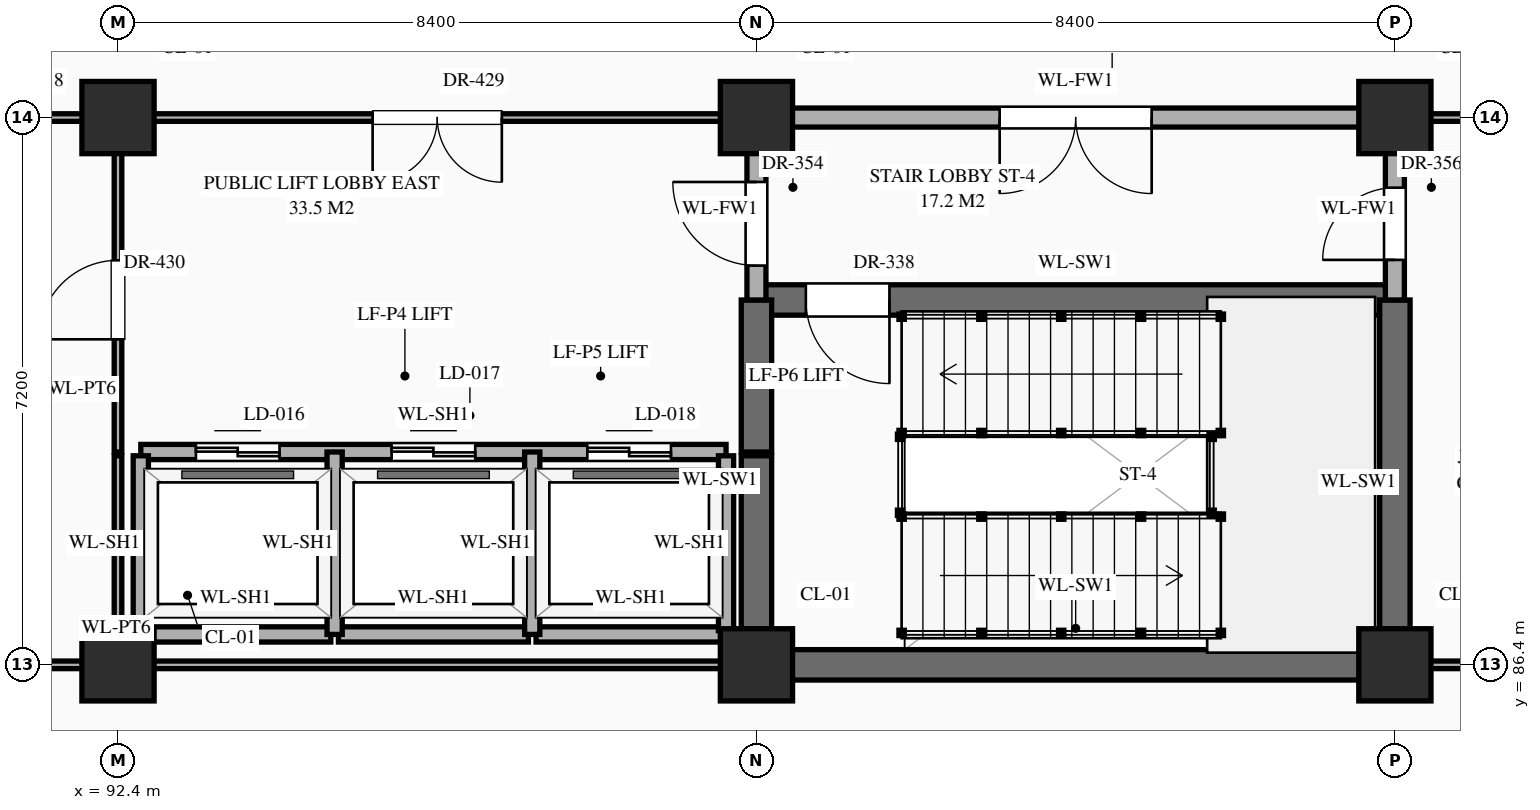
"""IFC4 building model, lengths in metres.
Left out: names, types, materials, properties, quantities, classifications, styles, units other than length and angle.
Written with IfcOpenShell. Run it as: python <this file> out.ifc"""

import sys

from ifc_helpers import new_model, si_unit, direction, frame, frame_2d, origin, origin_2d, place, context, subcontext, project, spatial, rectangle, extrude, element, fill, save


model = new_model("IFC4")
c1 = context("Model", 3, precision=1e-05, world=origin(), true_north=direction((0.0, 1.0)))
c2 = subcontext(c1, "Body", "Model", "MODEL_VIEW")
j1 = project(units=[si_unit("LENGTHUNIT", "METRE"), si_unit("PLANEANGLEUNIT", "RADIAN")], contexts=[c1])
p1 = place(None, origin())
s1 = spatial("IfcSite", under=j1, at=p1, CompositionType="ELEMENT")
p2 = place(p1, origin())
s2 = spatial("IfcBuilding", under=s1, at=p2, CompositionType="ELEMENT")
p3 = place(p2, frame((0.0, 0.0, -5.4)))
s3 = spatial("IfcBuildingStorey", under=s2, at=p3, CompositionType="ELEMENT", Elevation=-5.4)
for number, where, z_axis, x_axis in (
    (1, (92.4, 86.4, 0.0), (0.0, 0.0, 1.0), (1.0, 0.0, 0.0)),
    (2, (92.4, 93.6, 0.0), (0.0, 0.0, 1.0), (1.0, 0.0, 0.0)),
    (3, (100.8, 86.4, 0.0), (0.0, 0.0, 1.0), (1.0, 0.0, 0.0)),
    (4, (100.8, 93.6, 0.0), (0.0, 0.0, 1.0), (1.0, 0.0, 0.0)),
    (5, (109.2, 86.4, 0.0), (0.0, 0.0, 1.0), (1.0, 0.0, 0.0)),
    (6, (109.2, 93.6, 0.0), (0.0, 0.0, 1.0), (1.0, 0.0, 0.0)),
):
    element("IfcColumn", number, at=place(p3, frame(where, z_axis=z_axis, x_axis=x_axis)), inside=s3, PredefinedType="COLUMN", context=c2, shape_type="SweptSolid", body=[
        extrude(rectangle(XDim=0.95, YDim=0.95, at=origin_2d()), origin(), (0.0, 0.0, 1.0), 5.4),
    ])
p4 = place(p3, frame((84.0, 86.4, 0.0), z_axis=(0.0, 0.0, 1.0), x_axis=(1.0, 0.0, 0.0)))
e7 = element("IfcWall", 7, at=p4, inside=s3, PredefinedType="STANDARD", context=c2, shape_type="SweptSolid", body=[
    extrude(rectangle(XDim=8.4, YDim=0.1, at=frame_2d((4.2, 0.0))), origin(), (0.0, 0.0, 1.0), 4.25),
])
p5 = place(p4, frame((1.018, 0.0, 0.0)))
e8 = element("IfcOpeningElement", 8, at=p5, cuts=e7, PredefinedType="OPENING", context=c2, shape_type="SweptSolid", body=[
    extrude(rectangle(XDim=1.16, YDim=2.3, at=frame_2d((0.58, 1.15))), frame((0.0, 0.062, 0.0), z_axis=(0.0, -1.0, 0.0), x_axis=(1.0, 0.0, 0.0)), (0.0, 0.0, 1.0), 0.124),
])
p6 = place(p4, frame((3.58, 0.0, 0.0)))
e9 = element("IfcOpeningElement", 9, at=p6, cuts=e7, PredefinedType="OPENING", context=c2, shape_type="SweptSolid", body=[
    extrude(rectangle(XDim=1.24, YDim=2.3, at=frame_2d((0.62, 1.15))), frame((0.0, 0.062, 0.0), z_axis=(0.0, -1.0, 0.0), x_axis=(1.0, 0.0, 0.0)), (0.0, 0.0, 1.0), 0.124),
])
p7 = place(p4, frame((6.163, 0.0, 0.0)))
e10 = element("IfcOpeningElement", 10, at=p7, cuts=e7, PredefinedType="OPENING", context=c2, shape_type="SweptSolid", body=[
    extrude(rectangle(XDim=1.28, YDim=2.35, at=frame_2d((0.64, 1.175))), frame((0.0, 0.062, 0.0), z_axis=(0.0, -1.0, 0.0), x_axis=(1.0, 0.0, 0.0)), (0.0, 0.0, 1.0), 0.124),
])
p8 = place(p3, frame((92.45, 86.4, 0.0), z_axis=(0.0, 0.0, 1.0), x_axis=(1.0, 0.0, 0.0)))
e11 = element("IfcWall", 11, at=p8, inside=s3, PredefinedType="STANDARD", context=c2, shape_type="SweptSolid", body=[
    extrude(rectangle(XDim=8.3, YDim=0.1, at=frame_2d((4.15, 0.0))), origin(), (0.0, 0.0, 1.0), 4.25),
])
p9 = place(p3, frame((100.8, 86.4, 0.0), z_axis=(0.0, 0.0, 1.0), x_axis=(1.0, 0.0, 0.0)))
e12 = element("IfcWall", 12, at=p9, inside=s3, PredefinedType="SHEAR", context=c2, shape_type="SweptSolid", body=[
    extrude(rectangle(XDim=8.4, YDim=0.4, at=frame_2d((4.2, 0.0))), origin(), (0.0, 0.0, 1.0), 5.1),
])
p10 = place(p3, frame((109.2, 86.4, 0.0), z_axis=(0.0, 0.0, 1.0), x_axis=(1.0, 0.0, 0.0)))
e13 = element("IfcWall", 13, at=p10, inside=s3, PredefinedType="STANDARD", context=c2, shape_type="SweptSolid", body=[
    extrude(rectangle(XDim=8.4, YDim=0.1, at=frame_2d((4.2, 0.0))), origin(), (0.0, 0.0, 1.0), 4.25),
])
p11 = place(p10, frame((1.107, 0.0, 0.0)))
e14 = element("IfcOpeningElement", 14, at=p11, cuts=e13, PredefinedType="OPENING", context=c2, shape_type="SweptSolid", body=[
    extrude(rectangle(XDim=0.98, YDim=2.35, at=frame_2d((0.49, 1.175))), frame((0.0, 0.062, 0.0), z_axis=(0.0, -1.0, 0.0), x_axis=(1.0, 0.0, 0.0)), (0.0, 0.0, 1.0), 0.124),
])
p12 = place(p10, frame((3.67, 0.0, 0.0)))
e15 = element("IfcOpeningElement", 15, at=p12, cuts=e13, PredefinedType="OPENING", context=c2, shape_type="SweptSolid", body=[
    extrude(rectangle(XDim=1.06, YDim=2.4, at=frame_2d((0.53, 1.2))), frame((0.0, 0.062, 0.0), z_axis=(0.0, -1.0, 0.0), x_axis=(1.0, 0.0, 0.0)), (0.0, 0.0, 1.0), 0.124),
])
p13 = place(p10, frame((6.232, 0.0, 0.0)))
e16 = element("IfcOpeningElement", 16, at=p13, cuts=e13, PredefinedType="OPENING", context=c2, shape_type="SweptSolid", body=[
    extrude(rectangle(XDim=1.14, YDim=2.4, at=frame_2d((0.57, 1.2))), frame((0.0, 0.062, 0.0), z_axis=(0.0, -1.0, 0.0), x_axis=(1.0, 0.0, 0.0)), (0.0, 0.0, 1.0), 0.124),
])
for number, where, z_axis, x_axis in (
    (17, (92.7, 86.8, 0.0), (0.0, 0.0, 1.0), (1.0, 0.0, 0.0)),
    (18, (95.3, 86.8, 0.0), (0.0, 0.0, 1.0), (1.0, 0.0, 0.0)),
    (19, (97.9, 86.8, 0.0), (0.0, 0.0, 1.0), (1.0, 0.0, 0.0)),
):
    element("IfcWall", number, at=place(p3, frame(where, z_axis=z_axis, x_axis=x_axis)), inside=s3, PredefinedType="STANDARD", context=c2, shape_type="SweptSolid", body=[
        extrude(rectangle(XDim=2.5, YDim=0.2, at=frame_2d((1.25, 0.0))), origin(), (0.0, 0.0, 1.0), 5.1),
    ])
p14 = place(p3, frame((92.7, 89.2, 0.0), z_axis=(0.0, 0.0, 1.0), x_axis=(1.0, 0.0, 0.0)))
e20 = element("IfcWall", 20, at=p14, inside=s3, PredefinedType="STANDARD", context=c2, shape_type="SweptSolid", body=[
    extrude(rectangle(XDim=7.7, YDim=0.2, at=frame_2d((3.85, 0.0))), origin(), (0.0, 0.0, 1.0), 5.1),
])
p15 = place(p14, frame((0.725, 0.0, 0.0)))
e21 = element("IfcOpeningElement", 21, at=p15, cuts=e20, PredefinedType="OPENING", context=c2, shape_type="SweptSolid", body=[
    extrude(rectangle(XDim=1.1, YDim=2.15, at=frame_2d((0.55, 1.075))), frame((0.0, 0.112, 0.0), z_axis=(0.0, -1.0, 0.0), x_axis=(1.0, 0.0, 0.0)), (0.0, 0.0, 1.0), 0.224),
])
p16 = place(p14, frame((3.3, 0.0, 0.0)))
e22 = element("IfcOpeningElement", 22, at=p16, cuts=e20, PredefinedType="OPENING", context=c2, shape_type="SweptSolid", body=[
    extrude(rectangle(XDim=1.1, YDim=2.15, at=frame_2d((0.55, 1.075))), frame((0.0, 0.112, 0.0), z_axis=(0.0, -1.0, 0.0), x_axis=(1.0, 0.0, 0.0)), (0.0, 0.0, 1.0), 0.224),
])
p17 = place(p14, frame((5.875, 0.0, 0.0)))
e23 = element("IfcOpeningElement", 23, at=p17, cuts=e20, PredefinedType="OPENING", context=c2, shape_type="SweptSolid", body=[
    extrude(rectangle(XDim=1.1, YDim=2.15, at=frame_2d((0.55, 1.075))), frame((0.0, 0.112, 0.0), z_axis=(0.0, -1.0, 0.0), x_axis=(1.0, 0.0, 0.0)), (0.0, 0.0, 1.0), 0.224),
])
p18 = place(p3, frame((100.8, 91.2, 0.0), z_axis=(0.0, 0.0, 1.0), x_axis=(1.0, 0.0, 0.0)))
e24 = element("IfcWall", 24, at=p18, inside=s3, PredefinedType="SHEAR", context=c2, shape_type="SweptSolid", body=[
    extrude(rectangle(XDim=8.4, YDim=0.4, at=frame_2d((4.2, 0.0))), origin(), (0.0, 0.0, 1.0), 5.1),
])
p19 = place(p18, frame((0.65, 0.0, 0.0)))
e25 = element("IfcOpeningElement", 25, at=p19, cuts=e24, PredefinedType="OPENING", context=c2, shape_type="SweptSolid", body=[
    extrude(rectangle(XDim=1.1, YDim=2.2, at=frame_2d((0.55, 1.1))), frame((0.0, 0.212, 0.0), z_axis=(0.0, -1.0, 0.0), x_axis=(1.0, 0.0, 0.0)), (0.0, 0.0, 1.0), 0.424),
])
p20 = place(p3, frame((67.2, 93.6, 0.0), z_axis=(0.0, 0.0, 1.0), x_axis=(1.0, 0.0, 0.0)))
e26 = element("IfcWall", 26, at=p20, inside=s3, PredefinedType="STANDARD", context=c2, shape_type="SweptSolid", body=[
    extrude(rectangle(XDim=33.6, YDim=0.1, at=frame_2d((16.8, 0.0))), origin(), (0.0, 0.0, 1.0), 4.25),
])
p21 = place(p20, frame((3.425, 0.0, 0.0)))
e27 = element("IfcOpeningElement", 27, at=p21, cuts=e26, PredefinedType="OPENING", context=c2, shape_type="SweptSolid", body=[
    extrude(rectangle(XDim=1.55, YDim=2.35, at=frame_2d((0.775, 1.175))), frame((0.0, 0.062, 0.0), z_axis=(0.0, -1.0, 0.0), x_axis=(1.0, 0.0, 0.0)), (0.0, 0.0, 1.0), 0.124),
])
p22 = place(p20, frame((28.55, 0.0, 0.0)))
e28 = element("IfcOpeningElement", 28, at=p22, cuts=e26, PredefinedType="OPENING", context=c2, shape_type="SweptSolid", body=[
    extrude(rectangle(XDim=1.7, YDim=2.45, at=frame_2d((0.85, 1.225))), frame((0.0, 0.062, 0.0), z_axis=(0.0, -1.0, 0.0), x_axis=(1.0, 0.0, 0.0)), (0.0, 0.0, 1.0), 0.124),
])
p23 = place(p20, frame((11.875, 0.0, 0.0)))
e29 = element("IfcOpeningElement", 29, at=p23, cuts=e26, PredefinedType="OPENING", context=c2, shape_type="SweptSolid", body=[
    extrude(rectangle(XDim=1.45, YDim=2.3, at=frame_2d((0.725, 1.15))), frame((0.0, 0.062, 0.0), z_axis=(0.0, -1.0, 0.0), x_axis=(1.0, 0.0, 0.0)), (0.0, 0.0, 1.0), 0.124),
])
p24 = place(p20, frame((17.857, 0.0, 0.0)))
e30 = element("IfcOpeningElement", 30, at=p24, cuts=e26, PredefinedType="OPENING", context=c2, shape_type="SweptSolid", body=[
    extrude(rectangle(XDim=1.08, YDim=2.25, at=frame_2d((0.54, 1.125))), frame((0.0, 0.062, 0.0), z_axis=(0.0, -1.0, 0.0), x_axis=(1.0, 0.0, 0.0)), (0.0, 0.0, 1.0), 0.124),
])
p25 = place(p20, frame((20.44, 0.0, 0.0)))
e31 = element("IfcOpeningElement", 31, at=p25, cuts=e26, PredefinedType="OPENING", context=c2, shape_type="SweptSolid", body=[
    extrude(rectangle(XDim=1.12, YDim=2.25, at=frame_2d((0.56, 1.125))), frame((0.0, 0.062, 0.0), z_axis=(0.0, -1.0, 0.0), x_axis=(1.0, 0.0, 0.0)), (0.0, 0.0, 1.0), 0.124),
])
p26 = place(p20, frame((23.022, 0.0, 0.0)))
e32 = element("IfcOpeningElement", 32, at=p26, cuts=e26, PredefinedType="OPENING", context=c2, shape_type="SweptSolid", body=[
    extrude(rectangle(XDim=1.16, YDim=2.3, at=frame_2d((0.58, 1.15))), frame((0.0, 0.062, 0.0), z_axis=(0.0, -1.0, 0.0), x_axis=(1.0, 0.0, 0.0)), (0.0, 0.0, 1.0), 0.124),
])
p27 = place(p3, frame((100.8, 93.6, 0.0), z_axis=(0.0, 0.0, 1.0), x_axis=(1.0, 0.0, 0.0)))
e33 = element("IfcWall", 33, at=p27, inside=s3, PredefinedType="STANDARD", context=c2, shape_type="SweptSolid", body=[
    extrude(rectangle(XDim=8.4, YDim=0.25, at=frame_2d((4.2, 0.0))), origin(), (0.0, 0.0, 1.0), 4.25),
])
p28 = place(p27, frame((3.2, 0.0, 0.0)))
e34 = element("IfcOpeningElement", 34, at=p28, cuts=e33, PredefinedType="OPENING", context=c2, shape_type="SweptSolid", body=[
    extrude(rectangle(XDim=2.0, YDim=2.4, at=frame_2d((1.0, 1.2))), frame((0.0, 0.137, 0.0), z_axis=(0.0, -1.0, 0.0), x_axis=(1.0, 0.0, 0.0)), (0.0, 0.0, 1.0), 0.274),
])
p29 = place(p3, frame((109.2, 93.6, 0.0), z_axis=(0.0, 0.0, 1.0), x_axis=(1.0, 0.0, 0.0)))
e35 = element("IfcWall", 35, at=p29, inside=s3, PredefinedType="STANDARD", context=c2, shape_type="SweptSolid", body=[
    extrude(rectangle(XDim=8.4, YDim=0.1, at=frame_2d((4.2, 0.0))), origin(), (0.0, 0.0, 1.0), 4.25),
])
p30 = place(p29, frame((0.998, 0.0, 0.0)))
e36 = element("IfcOpeningElement", 36, at=p30, cuts=e35, PredefinedType="OPENING", context=c2, shape_type="SweptSolid", body=[
    extrude(rectangle(XDim=1.2, YDim=2.35, at=frame_2d((0.6, 1.175))), frame((0.0, 0.062, 0.0), z_axis=(0.0, -1.0, 0.0), x_axis=(1.0, 0.0, 0.0)), (0.0, 0.0, 1.0), 0.124),
])
p31 = place(p29, frame((3.58, 0.0, 0.0)))
e37 = element("IfcOpeningElement", 37, at=p31, cuts=e35, PredefinedType="OPENING", context=c2, shape_type="SweptSolid", body=[
    extrude(rectangle(XDim=1.24, YDim=2.3, at=frame_2d((0.62, 1.15))), frame((0.0, 0.062, 0.0), z_axis=(0.0, -1.0, 0.0), x_axis=(1.0, 0.0, 0.0)), (0.0, 0.0, 1.0), 0.124),
])
p32 = place(p29, frame((6.163, 0.0, 0.0)))
e38 = element("IfcOpeningElement", 38, at=p32, cuts=e35, PredefinedType="OPENING", context=c2, shape_type="SweptSolid", body=[
    extrude(rectangle(XDim=1.28, YDim=2.35, at=frame_2d((0.64, 1.175))), frame((0.0, 0.062, 0.0), z_axis=(0.0, -1.0, 0.0), x_axis=(1.0, 0.0, 0.0)), (0.0, 0.0, 1.0), 0.124),
])
p33 = place(p3, frame((92.4, 86.45, 0.0), z_axis=(0.0, 0.0, 1.0), x_axis=(0.0, 1.0, 0.0)))
e39 = element("IfcWall", 39, at=p33, inside=s3, PredefinedType="STANDARD", context=c2, shape_type="SweptSolid", body=[
    extrude(rectangle(XDim=2.7, YDim=0.1, at=frame_2d((1.35, 0.0))), origin(), (0.0, 0.0, 1.0), 4.35),
])
p34 = place(p3, frame((92.4, 89.2, 0.0), z_axis=(0.0, 0.0, 1.0), x_axis=(0.0, 1.0, 0.0)))
e40 = element("IfcWall", 40, at=p34, inside=s3, PredefinedType="STANDARD", context=c2, shape_type="SweptSolid", body=[
    extrude(rectangle(XDim=4.4, YDim=0.1, at=frame_2d((2.2, 0.0))), origin(), (0.0, 0.0, 1.0), 4.35),
])
p35 = place(p34, frame((1.482, 0.0, 0.0)))
e41 = element("IfcOpeningElement", 41, at=p35, cuts=e40, PredefinedType="OPENING", context=c2, shape_type="SweptSolid", body=[
    extrude(rectangle(XDim=1.04, YDim=2.2, at=frame_2d((0.52, 1.1))), frame((0.0, 0.062, 0.0), z_axis=(0.0, -1.0, 0.0), x_axis=(1.0, 0.0, 0.0)), (0.0, 0.0, 1.0), 0.124),
])
p36 = place(p3, frame((92.7, 86.85, 0.0), z_axis=(0.0, 0.0, 1.0), x_axis=(0.0, 1.0, 0.0)))
e42 = element("IfcWall", 42, at=p36, inside=s3, PredefinedType="STANDARD", context=c2, shape_type="SweptSolid", body=[
    extrude(rectangle(XDim=2.3, YDim=0.2, at=frame_2d((1.15, 0.0))), origin(), (0.0, 0.0, 1.0), 5.1),
])
for number, where, z_axis, x_axis in (
    (43, (95.25, 86.8, 0.0), (0.0, 0.0, 1.0), (0.0, 1.0, 0.0)),
    (44, (97.85, 86.8, 0.0), (0.0, 0.0, 1.0), (0.0, 1.0, 0.0)),
):
    element("IfcWall", number, at=place(p3, frame(where, z_axis=z_axis, x_axis=x_axis)), inside=s3, PredefinedType="STANDARD", context=c2, shape_type="SweptSolid", body=[
        extrude(rectangle(XDim=2.4, YDim=0.2, at=frame_2d((1.2, 0.0))), origin(), (0.0, 0.0, 1.0), 5.1),
    ])
p37 = place(p3, frame((100.4, 86.85, 0.0), z_axis=(0.0, 0.0, 1.0), x_axis=(0.0, 1.0, 0.0)))
e45 = element("IfcWall", 45, at=p37, inside=s3, PredefinedType="STANDARD", context=c2, shape_type="SweptSolid", body=[
    extrude(rectangle(XDim=2.3, YDim=0.2, at=frame_2d((1.15, 0.0))), origin(), (0.0, 0.0, 1.0), 5.1),
])
p38 = place(p3, frame((100.8, 86.45, 0.0), z_axis=(0.0, 0.0, 1.0), x_axis=(0.0, 1.0, 0.0)))
e46 = element("IfcWall", 46, at=p38, inside=s3, PredefinedType="SHEAR", context=c2, shape_type="SweptSolid", body=[
    extrude(rectangle(XDim=2.7, YDim=0.4, at=frame_2d((1.35, 0.0))), origin(), (0.0, 0.0, 1.0), 5.1),
])
p39 = place(p3, frame((100.8, 89.2, 0.0), z_axis=(0.0, 0.0, 1.0), x_axis=(0.0, 1.0, 0.0)))
e47 = element("IfcWall", 47, at=p39, inside=s3, PredefinedType="SHEAR", context=c2, shape_type="SweptSolid", body=[
    extrude(rectangle(XDim=2.0, YDim=0.4, at=frame_2d((1.0, 0.0))), origin(), (0.0, 0.0, 1.0), 5.1),
])
p40 = place(p3, frame((100.8, 91.2, 0.0), z_axis=(0.0, 0.0, 1.0), x_axis=(0.0, 1.0, 0.0)))
e48 = element("IfcWall", 48, at=p40, inside=s3, PredefinedType="STANDARD", context=c2, shape_type="SweptSolid", body=[
    extrude(rectangle(XDim=2.4, YDim=0.25, at=frame_2d((1.2, 0.0))), origin(), (0.0, 0.0, 1.0), 4.35),
])
p41 = place(p40, frame((0.452, 0.0, 0.0)))
e49 = element("IfcOpeningElement", 49, at=p41, cuts=e48, PredefinedType="OPENING", context=c2, shape_type="SweptSolid", body=[
    extrude(rectangle(XDim=1.1, YDim=2.2, at=frame_2d((0.55, 1.1))), frame((0.0, 0.137, 0.0), z_axis=(0.0, -1.0, 0.0), x_axis=(1.0, 0.0, 0.0)), (0.0, 0.0, 1.0), 0.274),
])
p42 = place(p3, frame((109.2, 86.4, 0.0), z_axis=(0.0, 0.0, 1.0), x_axis=(0.0, 1.0, 0.0)))
e50 = element("IfcWall", 50, at=p42, inside=s3, PredefinedType="SHEAR", context=c2, shape_type="SweptSolid", body=[
    extrude(rectangle(XDim=4.8, YDim=0.4, at=frame_2d((2.4, 0.0))), origin(), (0.0, 0.0, 1.0), 5.1),
])
p43 = place(p3, frame((109.2, 91.2, 0.0), z_axis=(0.0, 0.0, 1.0), x_axis=(0.0, 1.0, 0.0)))
e51 = element("IfcWall", 51, at=p43, inside=s3, PredefinedType="STANDARD", context=c2, shape_type="SweptSolid", body=[
    extrude(rectangle(XDim=2.4, YDim=0.25, at=frame_2d((1.2, 0.0))), origin(), (0.0, 0.0, 1.0), 4.35),
])
p44 = place(p43, frame((0.528, 0.0, 0.0)))
e52 = element("IfcOpeningElement", 52, at=p44, cuts=e51, PredefinedType="OPENING", context=c2, shape_type="SweptSolid", body=[
    extrude(rectangle(XDim=0.95, YDim=2.15, at=frame_2d((0.475, 1.075))), frame((0.0, 0.137, 0.0), z_axis=(0.0, -1.0, 0.0), x_axis=(1.0, 0.0, 0.0)), (0.0, 0.0, 1.0), 0.274),
])
p45 = place(p15, origin())
e53 = element("IfcDoor", 53, at=p45, inside=s3, OperationType="DOUBLE_DOOR_SLIDING", PredefinedType="DOOR", context=c2, shape_type="SweptSolid", body=[
    extrude(rectangle(XDim=1.1, YDim=2.15, at=frame_2d((0.55, 1.075))), frame((0.0, 0.025, 0.0), z_axis=(0.0, -1.0, 0.0), x_axis=(1.0, 0.0, 0.0)), (0.0, 0.0, 1.0), 0.05),
])
fill(e21, e53)
p46 = place(p16, origin())
e54 = element("IfcDoor", 54, at=p46, inside=s3, OperationType="DOUBLE_DOOR_SLIDING", PredefinedType="DOOR", context=c2, shape_type="SweptSolid", body=[
    extrude(rectangle(XDim=1.1, YDim=2.15, at=frame_2d((0.55, 1.075))), frame((0.0, 0.025, 0.0), z_axis=(0.0, -1.0, 0.0), x_axis=(1.0, 0.0, 0.0)), (0.0, 0.0, 1.0), 0.05),
])
fill(e22, e54)
p47 = place(p17, origin())
e55 = element("IfcDoor", 55, at=p47, inside=s3, OperationType="DOUBLE_DOOR_SLIDING", PredefinedType="DOOR", context=c2, shape_type="SweptSolid", body=[
    extrude(rectangle(XDim=1.1, YDim=2.15, at=frame_2d((0.55, 1.075))), frame((0.0, 0.025, 0.0), z_axis=(0.0, -1.0, 0.0), x_axis=(1.0, 0.0, 0.0)), (0.0, 0.0, 1.0), 0.05),
])
fill(e23, e55)
p48 = place(p19, frame((1.1, 0.0, 0.0), z_axis=(0.0, 0.0, 1.0), x_axis=(-1.0, 0.0, 0.0)))
e56 = element("IfcDoor", 56, at=p48, inside=s3, OperationType="SINGLE_SWING_LEFT", PredefinedType="DOOR", context=c2, shape_type="SweptSolid", body=[
    extrude(rectangle(XDim=1.1, YDim=2.2, at=frame_2d((0.55, 1.1))), frame((0.0, 0.025, 0.0), z_axis=(0.0, -1.0, 0.0), x_axis=(1.0, 0.0, 0.0)), (0.0, 0.0, 1.0), 0.05),
])
fill(e25, e56)
p49 = place(p41, origin())
e57 = element("IfcDoor", 57, at=p49, inside=s3, OperationType="SINGLE_SWING_RIGHT", PredefinedType="DOOR", context=c2, shape_type="SweptSolid", body=[
    extrude(rectangle(XDim=1.1, YDim=2.2, at=frame_2d((0.55, 1.1))), frame((0.0, 0.025, 0.0), z_axis=(0.0, -1.0, 0.0), x_axis=(1.0, 0.0, 0.0)), (0.0, 0.0, 1.0), 0.05),
])
fill(e49, e57)
p50 = place(p28, frame((2.0, 0.0, 0.0), z_axis=(0.0, 0.0, 1.0), x_axis=(-1.0, 0.0, 0.0)))
e58 = element("IfcDoor", 58, at=p50, inside=s3, OperationType="DOUBLE_DOOR_SINGLE_SWING", PredefinedType="DOOR", context=c2, shape_type="SweptSolid", body=[
    extrude(rectangle(XDim=2.0, YDim=2.4, at=frame_2d((1.0, 1.2))), frame((0.0, 0.025, 0.0), z_axis=(0.0, -1.0, 0.0), x_axis=(1.0, 0.0, 0.0)), (0.0, 0.0, 1.0), 0.05),
])
fill(e34, e58)
p51 = place(p44, origin())
e59 = element("IfcDoor", 59, at=p51, inside=s3, OperationType="SINGLE_SWING_LEFT", PredefinedType="DOOR", context=c2, shape_type="SweptSolid", body=[
    extrude(rectangle(XDim=0.95, YDim=2.15, at=frame_2d((0.475, 1.075))), frame((0.0, 0.025, 0.0), z_axis=(0.0, -1.0, 0.0), x_axis=(1.0, 0.0, 0.0)), (0.0, 0.0, 1.0), 0.05),
])
fill(e52, e59)
p52 = place(p22, frame((1.7, 0.0, 0.0), z_axis=(0.0, 0.0, 1.0), x_axis=(-1.0, 0.0, 0.0)))
e60 = element("IfcDoor", 60, at=p52, inside=s3, OperationType="DOUBLE_DOOR_SINGLE_SWING", PredefinedType="DOOR", context=c2, shape_type="SweptSolid", body=[
    extrude(rectangle(XDim=1.7, YDim=2.45, at=frame_2d((0.85, 1.225))), frame((0.0, 0.025, 0.0), z_axis=(0.0, -1.0, 0.0), x_axis=(1.0, 0.0, 0.0)), (0.0, 0.0, 1.0), 0.05),
])
fill(e28, e60)
p53 = place(p35, origin())
e61 = element("IfcDoor", 61, at=p53, inside=s3, OperationType="SINGLE_SWING_LEFT", PredefinedType="DOOR", context=c2, shape_type="SweptSolid", body=[
    extrude(rectangle(XDim=1.04, YDim=2.2, at=frame_2d((0.52, 1.1))), frame((0.0, 0.025, 0.0), z_axis=(0.0, -1.0, 0.0), x_axis=(1.0, 0.0, 0.0)), (0.0, 0.0, 1.0), 0.05),
])
fill(e41, e61)
save(model, sys.argv[1])
